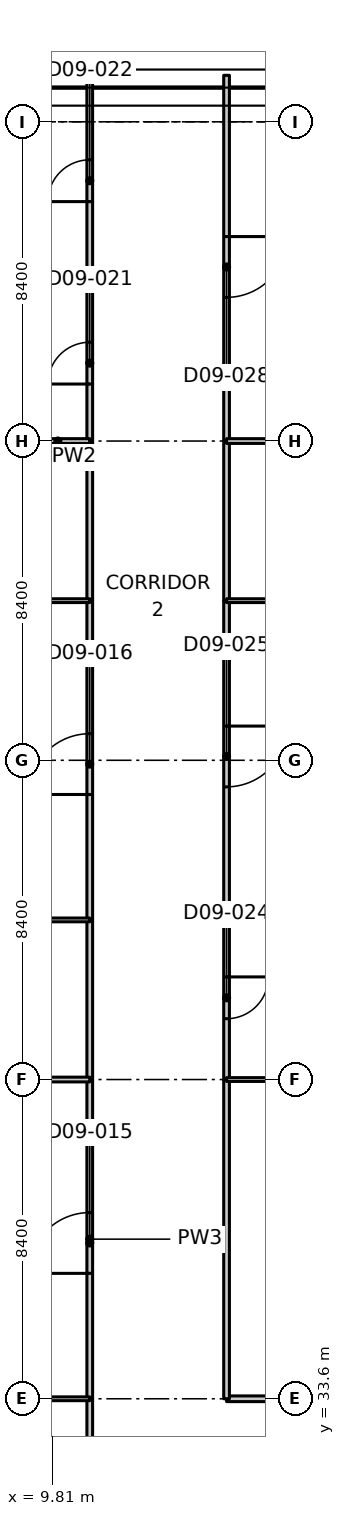
"""IFC4 building model, lengths in metres.
Left out: names, types, materials, properties, quantities, classifications, styles, units other than length and angle.
Written with IfcOpenShell. Run it as: python <this file> out.ifc"""

import sys

from ifc_helpers import new_model, si_unit, direction, frame, frame_2d, origin, place, context, subcontext, project, spatial, polyline, rectangle, outline, extrude, element, fill, save


model = new_model("IFC4")
c1 = context("Model", 3, precision=1e-05, world=origin(), true_north=direction((0.0, 1.0)))
c2 = subcontext(c1, "Body", "Model", "MODEL_VIEW")
j1 = project(units=[si_unit("LENGTHUNIT", "METRE"), si_unit("PLANEANGLEUNIT", "RADIAN")], contexts=[c1])
p1 = place(None, origin())
s1 = spatial("IfcSite", under=j1, at=p1, CompositionType="ELEMENT")
p2 = place(p1, origin())
s2 = spatial("IfcBuilding", under=s1, at=p2, CompositionType="ELEMENT")
p3 = place(p2, frame((0.0, 0.0, 58.1)))
s3 = spatial("IfcBuildingStorey", under=s2, at=p3, CompositionType="ELEMENT", Elevation=58.1)
p4 = place(p3, frame((10.8, 25.2, 0.0), z_axis=(0.0, 0.0, 1.0), x_axis=(0.0, 1.0, 0.0)))
e1 = element("IfcWall", 1, at=p4, inside=s3, PredefinedType="PARTITIONING", context=c2, shape_type="SweptSolid", body=[
    extrude(rectangle(XDim=8.4, YDim=0.15, at=frame_2d((4.2, 0.0))), origin(), (0.0, 0.0, 1.0), 3.33),
])
p5 = place(p4, frame((3.3, 0.0, 0.0)))
e2 = element("IfcOpeningElement", 2, at=p5, cuts=e1, PredefinedType="OPENING", context=c2, shape_type="SweptSolid", body=[
    extrude(rectangle(XDim=1.6, YDim=2.1, at=frame_2d((0.8, 1.05))), frame((0.0, 0.085, 0.0), z_axis=(0.0, -1.0, 0.0), x_axis=(1.0, 0.0, 0.0)), (0.0, 0.0, 1.0), 0.17),
])
p6 = place(p3, frame((14.4, 33.6, 0.0), z_axis=(0.0, 0.0, 1.0), x_axis=(1.0, 0.0, 0.0)))
e3 = element("IfcWall", 3, at=p6, inside=s3, PredefinedType="PARTITIONING", context=c2, shape_type="SweptSolid", body=[
    extrude(rectangle(XDim=1.5, YDim=0.15, at=frame_2d((0.75, 0.0))), origin(), (0.0, 0.0, 1.0), 3.33),
])
p7 = place(p3, frame((10.8, 33.6, 0.0), z_axis=(0.0, 0.0, 1.0), x_axis=(0.0, 1.0, 0.0)))
e4 = element("IfcWall", 4, at=p7, inside=s3, PredefinedType="PARTITIONING", context=c2, shape_type="SweptSolid", body=[
    extrude(rectangle(XDim=8.4, YDim=0.15, at=frame_2d((4.2, 0.0))), origin(), (0.0, 0.0, 1.0), 3.33),
])
p8 = place(p7, frame((3.3, 0.0, 0.0)))
e5 = element("IfcOpeningElement", 5, at=p8, cuts=e4, PredefinedType="OPENING", context=c2, shape_type="SweptSolid", body=[
    extrude(rectangle(XDim=1.6, YDim=2.1, at=frame_2d((0.8, 1.05))), frame((0.0, 0.085, 0.0), z_axis=(0.0, -1.0, 0.0), x_axis=(1.0, 0.0, 0.0)), (0.0, 0.0, 1.0), 0.17),
])
p9 = place(p3, frame((10.8, 46.2, 0.0), z_axis=(0.0, 0.0, 1.0), x_axis=(0.0, 1.0, 0.0)))
e6 = element("IfcWall", 6, at=p9, inside=s3, PredefinedType="PARTITIONING", context=c2, shape_type="SweptSolid", body=[
    extrude(rectangle(XDim=8.4, YDim=0.15, at=frame_2d((4.2, 0.0))), origin(), (0.0, 0.0, 1.0), 3.33),
])
p10 = place(p9, frame((3.3, 0.0, 0.0)))
e7 = element("IfcOpeningElement", 7, at=p10, cuts=e6, PredefinedType="OPENING", context=c2, shape_type="SweptSolid", body=[
    extrude(rectangle(XDim=1.6, YDim=2.1, at=frame_2d((0.8, 1.05))), frame((0.0, 0.085, 0.0), z_axis=(0.0, -1.0, 0.0), x_axis=(1.0, 0.0, 0.0)), (0.0, 0.0, 1.0), 0.17),
])
for number, where, z_axis, x_axis in (
    (8, (10.8, 54.6, 0.0), (0.0, 0.0, 1.0), (0.0, 1.0, 0.0)),
    (9, (10.8, 42.0, 0.0), (0.0, 0.0, 1.0), (0.0, 1.0, 0.0)),
):
    element("IfcWall", number, at=place(p3, frame(where, z_axis=z_axis, x_axis=x_axis)), inside=s3, PredefinedType="PARTITIONING", context=c2, shape_type="SweptSolid", body=[
        extrude(rectangle(XDim=4.2, YDim=0.15, at=frame_2d((2.1, 0.0))), origin(), (0.0, 0.0, 1.0), 3.33),
    ])
p11 = place(p3, frame((10.8, 58.8, 0.0), z_axis=(0.0, 0.0, 1.0), x_axis=(0.0, 1.0, 0.0)))
e10 = element("IfcWall", 10, at=p11, inside=s3, PredefinedType="PARTITIONING", context=c2, shape_type="SweptSolid", body=[
    extrude(rectangle(XDim=4.2, YDim=0.15, at=frame_2d((2.1, 0.0))), origin(), (0.0, 0.0, 1.0), 3.33),
])
p12 = place(p11, frame((1.5, 0.0, 0.0)))
e11 = element("IfcOpeningElement", 11, at=p12, cuts=e10, PredefinedType="OPENING", context=c2, shape_type="SweptSolid", body=[
    extrude(rectangle(XDim=1.1, YDim=2.1, at=frame_2d((0.55, 1.05))), frame((0.0, 0.085, 0.0), z_axis=(0.0, -1.0, 0.0), x_axis=(1.0, 0.0, 0.0)), (0.0, 0.0, 1.0), 0.17),
])
p13 = place(p3, frame((10.8, 63.0, 0.0), z_axis=(0.0, 0.0, 1.0), x_axis=(0.0, 1.0, 0.0)))
e12 = element("IfcWall", 12, at=p13, inside=s3, PredefinedType="PARTITIONING", context=c2, shape_type="SweptSolid", body=[
    extrude(outline(polyline([(0.0, 0.0), (5.423, 0.0), (5.423, 3.33), (5.28, 3.33), (4.65, 3.33), (4.648, 2.98), (3.752, 2.98), (3.75, 3.33), (0.0, 3.33), (0.0, 0.0)])), frame((0.0, 0.075, 0.0), z_axis=(0.0, -1.0, 0.0), x_axis=(1.0, 0.0, 0.0)), (0.0, 0.0, 1.0), 0.15),
])
p14 = place(p13, frame((2.1, 0.0, 0.0)))
e13 = element("IfcOpeningElement", 13, at=p14, cuts=e12, PredefinedType="OPENING", context=c2, shape_type="SweptSolid", body=[
    extrude(rectangle(XDim=1.1, YDim=2.1, at=frame_2d((0.55, 1.05))), frame((0.0, 0.085, 0.0), z_axis=(0.0, -1.0, 0.0), x_axis=(1.0, 0.0, 0.0)), (0.0, 0.0, 1.0), 0.17),
])
p15 = place(p3, frame((14.4, 42.0, 0.0), z_axis=(0.0, 0.0, 1.0), x_axis=(0.0, -1.0, 0.0)))
e14 = element("IfcWall", 14, at=p15, inside=s3, PredefinedType="PARTITIONING", context=c2, shape_type="SweptSolid", body=[
    extrude(rectangle(XDim=8.4, YDim=0.15, at=frame_2d((4.2, 0.0))), origin(), (0.0, 0.0, 1.0), 3.33),
])
p16 = place(p3, frame((14.4, 46.2, 0.0), z_axis=(0.0, 0.0, 1.0), x_axis=(0.0, -1.0, 0.0)))
e15 = element("IfcWall", 15, at=p16, inside=s3, PredefinedType="PARTITIONING", context=c2, shape_type="SweptSolid", body=[
    extrude(rectangle(XDim=4.2, YDim=0.15, at=frame_2d((2.1, 0.0))), origin(), (0.0, 0.0, 1.0), 3.33),
])
p17 = place(p16, frame((1.5, 0.0, 0.0)))
e16 = element("IfcOpeningElement", 16, at=p17, cuts=e15, PredefinedType="OPENING", context=c2, shape_type="SweptSolid", body=[
    extrude(rectangle(XDim=1.1, YDim=2.1, at=frame_2d((0.55, 1.05))), frame((0.0, 0.085, 0.0), z_axis=(0.0, -1.0, 0.0), x_axis=(1.0, 0.0, 0.0)), (0.0, 0.0, 1.0), 0.17),
])
p18 = place(p3, frame((14.4, 54.6, 0.0), z_axis=(0.0, 0.0, 1.0), x_axis=(0.0, -1.0, 0.0)))
e17 = element("IfcWall", 17, at=p18, inside=s3, PredefinedType="PARTITIONING", context=c2, shape_type="SweptSolid", body=[
    extrude(rectangle(XDim=8.4, YDim=0.15, at=frame_2d((4.2, 0.0))), origin(), (0.0, 0.0, 1.0), 3.33),
])
p19 = place(p18, frame((3.3, 0.0, 0.0)))
e18 = element("IfcOpeningElement", 18, at=p19, cuts=e17, PredefinedType="OPENING", context=c2, shape_type="SweptSolid", body=[
    extrude(rectangle(XDim=1.6, YDim=2.1, at=frame_2d((0.8, 1.05))), frame((0.0, 0.085, 0.0), z_axis=(0.0, -1.0, 0.0), x_axis=(1.0, 0.0, 0.0)), (0.0, 0.0, 1.0), 0.17),
])
p20 = place(p3, frame((14.4, 58.8, 0.0), z_axis=(0.0, 0.0, 1.0), x_axis=(0.0, -1.0, 0.0)))
e19 = element("IfcWall", 19, at=p20, inside=s3, PredefinedType="PARTITIONING", context=c2, shape_type="SweptSolid", body=[
    extrude(rectangle(XDim=4.2, YDim=0.15, at=frame_2d((2.1, 0.0))), origin(), (0.0, 0.0, 1.0), 3.33),
])
p21 = place(p3, frame((14.4, 68.423, 0.0), z_axis=(0.0, 0.0, 1.0), x_axis=(0.0, -1.0, 0.0)))
e20 = element("IfcWall", 20, at=p21, inside=s3, PredefinedType="PARTITIONING", context=c2, shape_type="SweptSolid", body=[
    extrude(outline(polyline([(0.0, 0.0), (9.623, 0.0), (9.623, 3.33), (1.673, 3.33), (1.671, 2.98), (0.775, 2.98), (0.773, 3.33), (0.143, 3.33), (0.0, 3.33), (0.0, 0.0)])), frame((0.0, 0.075, 0.0), z_axis=(0.0, -1.0, 0.0), x_axis=(1.0, 0.0, 0.0)), (0.0, 0.0, 1.0), 0.15),
])
p22 = place(p21, frame((4.243, 0.0, 0.0)))
e21 = element("IfcOpeningElement", 21, at=p22, cuts=e20, PredefinedType="OPENING", context=c2, shape_type="SweptSolid", body=[
    extrude(rectangle(XDim=1.6, YDim=2.1, at=frame_2d((0.8, 1.05))), frame((0.0, 0.085, 0.0), z_axis=(0.0, -1.0, 0.0), x_axis=(1.0, 0.0, 0.0)), (0.0, 0.0, 1.0), 0.17),
])
p23 = place(p3, frame((9.12, 33.6, 0.0), z_axis=(0.0, 0.0, 1.0), x_axis=(1.0, 0.0, 0.0)))
e22 = element("IfcWall", 22, at=p23, inside=s3, PredefinedType="PARTITIONING", context=c2, shape_type="SweptSolid", body=[
    extrude(rectangle(XDim=1.68, YDim=0.1, at=frame_2d((0.84, 0.0))), origin(), (0.0, 0.0, 1.0), 3.33),
])
p24 = place(p3, frame((9.12, 42.0, 0.0), z_axis=(0.0, 0.0, 1.0), x_axis=(1.0, 0.0, 0.0)))
e23 = element("IfcWall", 23, at=p24, inside=s3, PredefinedType="PARTITIONING", context=c2, shape_type="SweptSolid", body=[
    extrude(rectangle(XDim=1.68, YDim=0.125, at=frame_2d((0.84, 0.0))), origin(), (0.0, 0.0, 1.0), 3.33),
])
p25 = place(p3, frame((4.2, 54.6, 0.0), z_axis=(0.0, 0.0, 1.0), x_axis=(1.0, 0.0, 0.0)))
e24 = element("IfcWall", 24, at=p25, inside=s3, PredefinedType="PARTITIONING", context=c2, shape_type="SweptSolid", body=[
    extrude(rectangle(XDim=6.6, YDim=0.1, at=frame_2d((3.3, 0.0))), origin(), (0.0, 0.0, 1.0), 3.33),
])
p26 = place(p25, frame((2.7, 0.0, 0.0)))
e25 = element("IfcOpeningElement", 25, at=p26, cuts=e24, PredefinedType="OPENING", context=c2, shape_type="SweptSolid", body=[
    extrude(rectangle(XDim=1.0, YDim=2.1, at=frame_2d((0.5, 1.05))), frame((0.0, 0.06, 0.0), z_axis=(0.0, -1.0, 0.0), x_axis=(1.0, 0.0, 0.0)), (0.0, 0.0, 1.0), 0.12),
])
p27 = place(p3, frame((10.8, 46.2, 0.0), z_axis=(0.0, 0.0, 1.0), x_axis=(-1.0, 0.0, 0.0)))
e26 = element("IfcWall", 26, at=p27, inside=s3, PredefinedType="PARTITIONING", context=c2, shape_type="SweptSolid", body=[
    extrude(rectangle(XDim=7.2, YDim=0.1, at=frame_2d((3.6, 0.0))), origin(), (0.0, 0.0, 1.0), 3.33),
])
p28 = place(p27, frame((3.0, 0.0, 0.0)))
e27 = element("IfcOpeningElement", 27, at=p28, cuts=e26, PredefinedType="OPENING", context=c2, shape_type="SweptSolid", body=[
    extrude(rectangle(XDim=1.0, YDim=2.1, at=frame_2d((0.5, 1.05))), frame((0.0, 0.06, 0.0), z_axis=(0.0, -1.0, 0.0), x_axis=(1.0, 0.0, 0.0)), (0.0, 0.0, 1.0), 0.12),
])
p29 = place(p3, frame((9.12, 58.8, 0.0), z_axis=(0.0, 0.0, 1.0), x_axis=(1.0, 0.0, 0.0)))
e28 = element("IfcWall", 28, at=p29, inside=s3, PredefinedType="PARTITIONING", context=c2, shape_type="SweptSolid", body=[
    extrude(rectangle(XDim=1.68, YDim=0.125, at=frame_2d((0.84, 0.0))), origin(), (0.0, 0.0, 1.0), 3.33),
])
p30 = place(p3, frame((-0.2, 63.0, 0.0), z_axis=(0.0, 0.0, 1.0), x_axis=(1.0, 0.0, 0.0)))
e29 = element("IfcWall", 29, at=p30, inside=s3, PredefinedType="PARTITIONING", context=c2, shape_type="SweptSolid", body=[
    extrude(outline(polyline([(0.0, 0.0), (11.0, 0.0), (11.0, 3.33), (5.066, 3.33), (5.064, 2.98), (3.736, 2.98), (3.734, 3.33), (0.0, 3.33), (0.0, 0.0)])), frame((0.0, 0.05, 0.0), z_axis=(0.0, -1.0, 0.0), x_axis=(1.0, 0.0, 0.0)), (0.0, 0.0, 1.0), 0.1),
])
p31 = place(p3, frame((14.4, 42.0, 0.0), z_axis=(0.0, 0.0, 1.0), x_axis=(1.0, 0.0, 0.0)))
e30 = element("IfcWall", 30, at=p31, inside=s3, PredefinedType="PARTITIONING", context=c2, shape_type="SweptSolid", body=[
    extrude(rectangle(XDim=1.68, YDim=0.1, at=frame_2d((0.84, 0.0))), origin(), (0.0, 0.0, 1.0), 3.33),
])
p32 = place(p3, frame((14.4, 46.2, 0.0), z_axis=(0.0, 0.0, 1.0), x_axis=(1.0, 0.0, 0.0)))
e31 = element("IfcWall", 31, at=p32, inside=s3, PredefinedType="PARTITIONING", context=c2, shape_type="SweptSolid", body=[
    extrude(outline(polyline([(0.0, 0.0), (11.974, 0.0), (11.974, 3.33), (11.9, 3.33), (11.25, 3.33), (11.248, 2.98), (10.352, 2.98), (10.35, 3.33), (0.0, 3.33), (0.0, 0.0)])), frame((0.0, 0.062, 0.0), z_axis=(0.0, -1.0, 0.0), x_axis=(1.0, 0.0, 0.0)), (0.0, 0.0, 1.0), 0.125),
])
p33 = place(p3, frame((14.4, 54.6, 0.0), z_axis=(0.0, 0.0, 1.0), x_axis=(1.0, 0.0, 0.0)))
e32 = element("IfcWall", 32, at=p33, inside=s3, PredefinedType="PARTITIONING", context=c2, shape_type="SweptSolid", body=[
    extrude(rectangle(XDim=7.8, YDim=0.1, at=frame_2d((3.9, 0.0))), origin(), (0.0, 0.0, 1.0), 3.33),
])
p34 = place(p33, frame((3.3, 0.0, 0.0)))
e33 = element("IfcOpeningElement", 33, at=p34, cuts=e32, PredefinedType="OPENING", context=c2, shape_type="SweptSolid", body=[
    extrude(rectangle(XDim=1.0, YDim=2.1, at=frame_2d((0.5, 1.05))), frame((0.0, 0.06, 0.0), z_axis=(0.0, -1.0, 0.0), x_axis=(1.0, 0.0, 0.0)), (0.0, 0.0, 1.0), 0.12),
])
p35 = place(p3, frame((14.4, 58.8, 0.0), z_axis=(0.0, 0.0, 1.0), x_axis=(1.0, 0.0, 0.0)))
e34 = element("IfcWall", 34, at=p35, inside=s3, PredefinedType="PARTITIONING", context=c2, shape_type="SweptSolid", body=[
    extrude(rectangle(XDim=1.68, YDim=0.125, at=frame_2d((0.84, 0.0))), origin(), (0.0, 0.0, 1.0), 3.33),
])
p36 = place(p8, origin())
e35 = element("IfcDoor", 35, at=p36, inside=s3, OperationType="DOUBLE_DOOR_SINGLE_SWING", PredefinedType="DOOR", context=c2, shape_type="SweptSolid", body=[
    extrude(rectangle(XDim=1.6, YDim=2.1, at=frame_2d((0.8, 1.05))), frame((0.0, 0.025, 0.0), z_axis=(0.0, -1.0, 0.0), x_axis=(1.0, 0.0, 0.0)), (0.0, 0.0, 1.0), 0.05),
])
fill(e5, e35)
p37 = place(p10, origin())
e36 = element("IfcDoor", 36, at=p37, inside=s3, OperationType="DOUBLE_DOOR_SINGLE_SWING", PredefinedType="DOOR", context=c2, shape_type="SweptSolid", body=[
    extrude(rectangle(XDim=1.6, YDim=2.1, at=frame_2d((0.8, 1.05))), frame((0.0, 0.025, 0.0), z_axis=(0.0, -1.0, 0.0), x_axis=(1.0, 0.0, 0.0)), (0.0, 0.0, 1.0), 0.05),
])
fill(e7, e36)
p38 = place(p12, origin())
e37 = element("IfcDoor", 37, at=p38, inside=s3, OperationType="SINGLE_SWING_LEFT", PredefinedType="DOOR", context=c2, shape_type="SweptSolid", body=[
    extrude(rectangle(XDim=1.1, YDim=2.1, at=frame_2d((0.55, 1.05))), frame((0.0, 0.025, 0.0), z_axis=(0.0, -1.0, 0.0), x_axis=(1.0, 0.0, 0.0)), (0.0, 0.0, 1.0), 0.05),
])
fill(e11, e37)
p39 = place(p14, origin())
e38 = element("IfcDoor", 38, at=p39, inside=s3, OperationType="SINGLE_SWING_LEFT", PredefinedType="DOOR", context=c2, shape_type="SweptSolid", body=[
    extrude(rectangle(XDim=1.1, YDim=2.1, at=frame_2d((0.55, 1.05))), frame((0.0, 0.025, 0.0), z_axis=(0.0, -1.0, 0.0), x_axis=(1.0, 0.0, 0.0)), (0.0, 0.0, 1.0), 0.05),
])
fill(e13, e38)
p40 = place(p17, origin())
e39 = element("IfcDoor", 39, at=p40, inside=s3, OperationType="SINGLE_SWING_LEFT", PredefinedType="DOOR", context=c2, shape_type="SweptSolid", body=[
    extrude(rectangle(XDim=1.1, YDim=2.1, at=frame_2d((0.55, 1.05))), frame((0.0, 0.025, 0.0), z_axis=(0.0, -1.0, 0.0), x_axis=(1.0, 0.0, 0.0)), (0.0, 0.0, 1.0), 0.05),
])
fill(e16, e39)
p41 = place(p19, origin())
e40 = element("IfcDoor", 40, at=p41, inside=s3, OperationType="DOUBLE_DOOR_SINGLE_SWING", PredefinedType="DOOR", context=c2, shape_type="SweptSolid", body=[
    extrude(rectangle(XDim=1.6, YDim=2.1, at=frame_2d((0.8, 1.05))), frame((0.0, 0.025, 0.0), z_axis=(0.0, -1.0, 0.0), x_axis=(1.0, 0.0, 0.0)), (0.0, 0.0, 1.0), 0.05),
])
fill(e18, e40)
p42 = place(p22, origin())
e41 = element("IfcDoor", 41, at=p42, inside=s3, OperationType="DOUBLE_DOOR_SINGLE_SWING", PredefinedType="DOOR", context=c2, shape_type="SweptSolid", body=[
    extrude(rectangle(XDim=1.6, YDim=2.1, at=frame_2d((0.8, 1.05))), frame((0.0, 0.025, 0.0), z_axis=(0.0, -1.0, 0.0), x_axis=(1.0, 0.0, 0.0)), (0.0, 0.0, 1.0), 0.05),
])
fill(e21, e41)
save(model, sys.argv[1])
